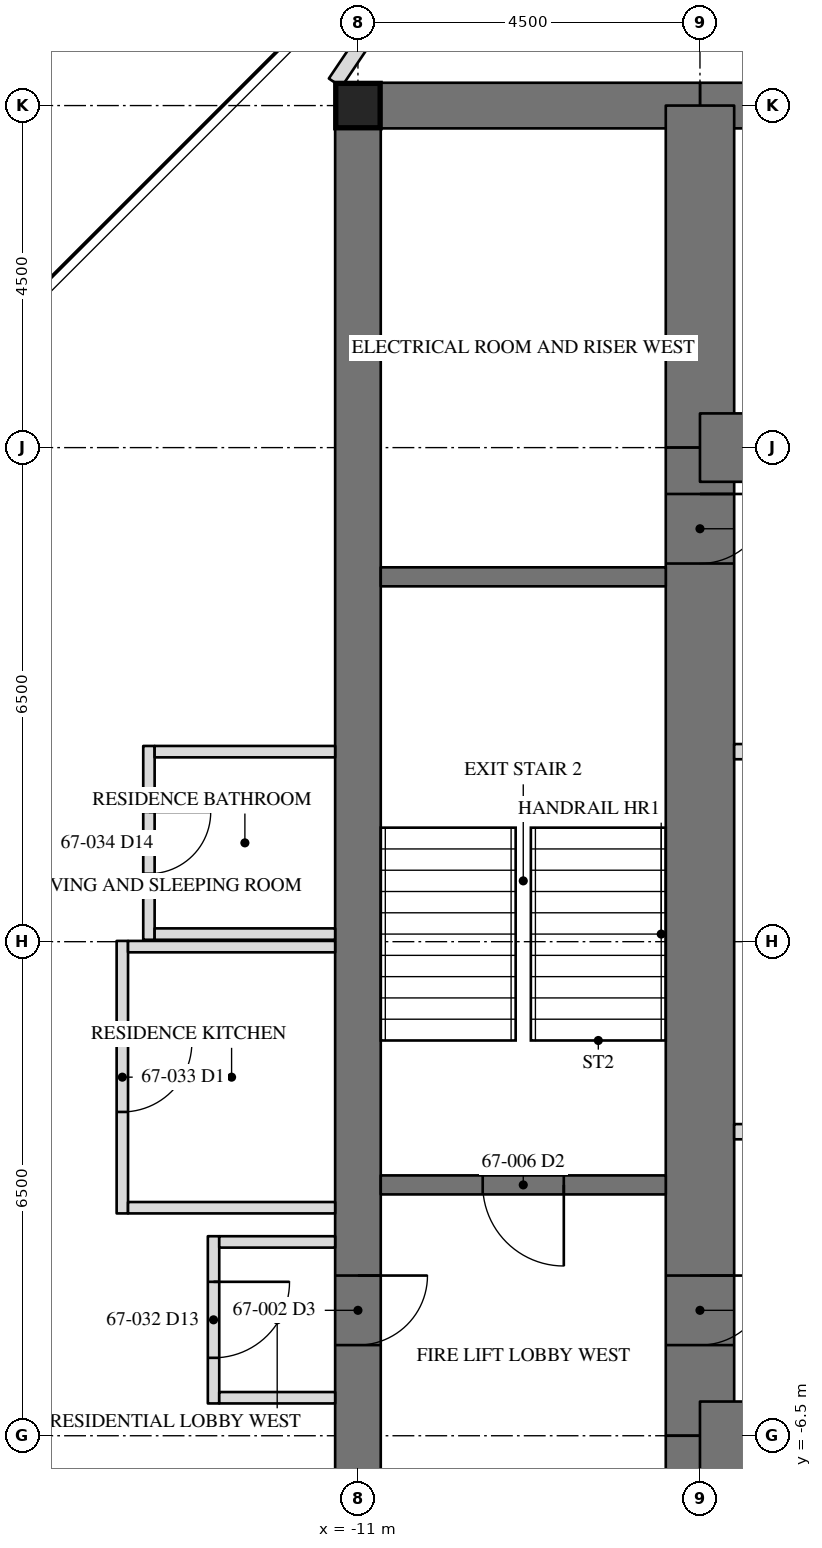
"""IFC4 building model, lengths in metres.
Left out: names, types, materials, properties, quantities, classifications, styles, units other than length and angle.
Written with IfcOpenShell. Run it as: python <this file> out.ifc"""

import sys

from ifc_helpers import new_model, si_unit, direction, frame, frame_2d, origin, origin_2d, place, context, subcontext, project, spatial, rectangle, hollow_rectangle, extrude, element, fill, save


model = new_model("IFC4")
c1 = context("Model", 3, precision=1e-05, world=origin(), true_north=direction((0.0, 1.0)))
c2 = subcontext(c1, "Body", "Model", "MODEL_VIEW")
j1 = project(units=[si_unit("LENGTHUNIT", "METRE"), si_unit("PLANEANGLEUNIT", "RADIAN")], contexts=[c1])
p1 = place(None, origin())
s1 = spatial("IfcSite", under=j1, at=p1, CompositionType="ELEMENT")
p2 = place(p1, origin())
s2 = spatial("IfcBuilding", under=s1, at=p2, CompositionType="ELEMENT")
p3 = place(p2, frame((0.0, 0.0, 274.0)))
s3 = spatial("IfcBuildingStorey", under=s2, at=p3, CompositionType="ELEMENT", Elevation=274.0)
p4 = place(p3, frame((-11.0, 11.0, 0.0), z_axis=(0.0, 0.0, 1.0), x_axis=(0.0, -1.0, 0.0)))
e1 = element("IfcWall", 1, at=p4, inside=s3, PredefinedType="SHEAR", context=c2, shape_type="SweptSolid", body=[
    extrude(rectangle(XDim=22.0, YDim=0.6, at=frame_2d((11.0, 0.0))), origin(), (0.0, 0.0, 1.0), 3.6),
])
p5 = place(p4, frame((15.393, 0.0, 0.0)))
e2 = element("IfcOpeningElement", 2, at=p5, cuts=e1, PredefinedType="OPENING", context=c2, shape_type="SweptSolid", body=[
    extrude(rectangle(XDim=0.915, YDim=2.134, at=frame_2d((0.458, 1.067))), frame((0.0, 0.31, 0.0), z_axis=(0.0, -1.0, 0.0), x_axis=(1.0, 0.0, 0.0)), (0.0, 0.0, 1.0), 0.62),
])
p6 = place(p3, frame((6.5, 11.0, 0.0), z_axis=(0.0, 0.0, 1.0), x_axis=(-1.0, 0.0, 0.0)))
e3 = element("IfcWall", 3, at=p6, inside=s3, PredefinedType="SHEAR", context=c2, shape_type="SweptSolid", body=[
    extrude(rectangle(XDim=13.0, YDim=0.6, at=frame_2d((6.5, 0.0))), origin(), (0.0, 0.0, 1.0), 3.6),
])
p7 = place(p6, frame((6.0, 0.0, 0.0)))
e4 = element("IfcOpeningElement", 4, at=p7, cuts=e3, PredefinedType="OPENING", context=c2, shape_type="SweptSolid", body=[
    extrude(rectangle(XDim=1.0, YDim=2.134, at=frame_2d((0.5, 1.067))), frame((0.0, 0.31, 0.0), z_axis=(0.0, -1.0, 0.0), x_axis=(1.0, 0.0, 0.0)), (0.0, 0.0, 1.0), 0.62),
])
p8 = place(p3, frame((-6.5, 11.0, 0.0), z_axis=(0.0, 0.0, 1.0), x_axis=(-1.0, 0.0, 0.0)))
e5 = element("IfcWall", 5, at=p8, inside=s3, PredefinedType="SHEAR", context=c2, shape_type="SweptSolid", body=[
    extrude(rectangle(XDim=4.5, YDim=0.6, at=frame_2d((2.25, 0.0))), origin(), (0.0, 0.0, 1.0), 3.6),
])
p9 = place(p3, frame((-6.5, 11.0, 0.0), z_axis=(0.0, 0.0, 1.0), x_axis=(0.0, -1.0, 0.0)))
e6 = element("IfcWall", 6, at=p9, inside=s3, PredefinedType="SHEAR", context=c2, shape_type="SweptSolid", body=[
    extrude(rectangle(XDim=4.5, YDim=0.9, at=frame_2d((2.25, 0.0))), origin(), (0.0, 0.0, 1.0), 3.6),
])
p10 = place(p3, frame((-6.5, 6.5, 0.0), z_axis=(0.0, 0.0, 1.0), x_axis=(0.0, -1.0, 0.0)))
e7 = element("IfcWall", 7, at=p10, inside=s3, PredefinedType="SHEAR", context=c2, shape_type="SweptSolid", body=[
    extrude(rectangle(XDim=13.0, YDim=0.9, at=frame_2d((6.5, 0.0))), origin(), (0.0, 0.0, 1.0), 3.6),
])
p11 = place(p10, frame((10.893, 0.0, 0.0)))
e8 = element("IfcOpeningElement", 8, at=p11, cuts=e7, PredefinedType="OPENING", context=c2, shape_type="SweptSolid", body=[
    extrude(rectangle(XDim=0.915, YDim=2.134, at=frame_2d((0.458, 1.067))), frame((0.0, 0.46, 0.0), z_axis=(0.0, -1.0, 0.0), x_axis=(1.0, 0.0, 0.0)), (0.0, 0.0, 1.0), 0.92),
])
p12 = place(p10, frame((0.61, 0.0, 0.0)))
e9 = element("IfcOpeningElement", 9, at=p12, cuts=e7, PredefinedType="OPENING", context=c2, shape_type="SweptSolid", body=[
    extrude(rectangle(XDim=0.915, YDim=2.134, at=frame_2d((0.458, 1.067))), frame((0.0, 0.46, 0.0), z_axis=(0.0, -1.0, 0.0), x_axis=(1.0, 0.0, 0.0)), (0.0, 0.0, 1.0), 0.92),
])
p13 = place(p3, frame((-6.5, -6.5, 0.0), z_axis=(0.0, 0.0, 1.0), x_axis=(0.0, -1.0, 0.0)))
e10 = element("IfcWall", 10, at=p13, inside=s3, PredefinedType="SHEAR", context=c2, shape_type="SweptSolid", body=[
    extrude(rectangle(XDim=4.5, YDim=0.9, at=frame_2d((2.25, 0.0))), origin(), (0.0, 0.0, 1.0), 3.6),
])
p14 = place(p3, frame((6.5, 6.5, 0.0), z_axis=(0.0, 0.0, 1.0), x_axis=(-1.0, 0.0, 0.0)))
e11 = element("IfcWall", 11, at=p14, inside=s3, PredefinedType="SHEAR", context=c2, shape_type="SweptSolid", body=[
    extrude(rectangle(XDim=13.0, YDim=0.9, at=frame_2d((6.5, 0.0))), origin(), (0.0, 0.0, 1.0), 3.6),
])
p15 = place(p14, frame((6.042, 0.0, 0.0)))
e12 = element("IfcOpeningElement", 12, at=p15, cuts=e11, PredefinedType="OPENING", context=c2, shape_type="SweptSolid", body=[
    extrude(rectangle(XDim=0.915, YDim=2.134, at=frame_2d((0.458, 1.067))), frame((0.0, 0.46, 0.0), z_axis=(0.0, -1.0, 0.0), x_axis=(1.0, 0.0, 0.0)), (0.0, 0.0, 1.0), 0.92),
])
p16 = place(p14, frame((9.766, 0.0, 0.0)))
e13 = element("IfcOpeningElement", 13, at=p16, cuts=e11, PredefinedType="OPENING", context=c2, shape_type="SweptSolid", body=[
    extrude(rectangle(XDim=1.118, YDim=2.134, at=frame_2d((0.559, 1.067))), frame((0.0, 0.46, 0.0), z_axis=(0.0, -1.0, 0.0), x_axis=(1.0, 0.0, 0.0)), (0.0, 0.0, 1.0), 0.92),
])
p17 = place(p14, frame((2.218, 0.0, 0.0)))
e14 = element("IfcOpeningElement", 14, at=p17, cuts=e11, PredefinedType="OPENING", context=c2, shape_type="SweptSolid", body=[
    extrude(rectangle(XDim=0.915, YDim=2.134, at=frame_2d((0.458, 1.067))), frame((0.0, 0.46, 0.0), z_axis=(0.0, -1.0, 0.0), x_axis=(1.0, 0.0, 0.0)), (0.0, 0.0, 1.0), 0.92),
])
p18 = place(p3, frame((-6.5, -6.5, 0.0), z_axis=(0.0, 0.0, 1.0), x_axis=(1.0, 0.0, 0.0)))
e15 = element("IfcWall", 15, at=p18, inside=s3, PredefinedType="SHEAR", context=c2, shape_type="SweptSolid", body=[
    extrude(rectangle(XDim=13.0, YDim=0.9, at=frame_2d((6.5, 0.0))), origin(), (0.0, 0.0, 1.0), 3.6),
])
p19 = place(p18, frame((6.042, 0.0, 0.0)))
e16 = element("IfcOpeningElement", 16, at=p19, cuts=e15, PredefinedType="OPENING", context=c2, shape_type="SweptSolid", body=[
    extrude(rectangle(XDim=0.915, YDim=2.134, at=frame_2d((0.458, 1.067))), frame((0.0, 0.46, 0.0), z_axis=(0.0, -1.0, 0.0), x_axis=(1.0, 0.0, 0.0)), (0.0, 0.0, 1.0), 0.92),
])
p20 = place(p18, frame((1.917, 0.0, 0.0)))
e17 = element("IfcOpeningElement", 17, at=p20, cuts=e15, PredefinedType="OPENING", context=c2, shape_type="SweptSolid", body=[
    extrude(rectangle(XDim=0.915, YDim=2.134, at=frame_2d((0.458, 1.067))), frame((0.0, 0.46, 0.0), z_axis=(0.0, -1.0, 0.0), x_axis=(1.0, 0.0, 0.0)), (0.0, 0.0, 1.0), 0.92),
])
p21 = place(p18, frame((9.567, 0.0, 0.0)))
e18 = element("IfcOpeningElement", 18, at=p21, cuts=e15, PredefinedType="OPENING", context=c2, shape_type="SweptSolid", body=[
    extrude(rectangle(XDim=0.915, YDim=2.134, at=frame_2d((0.458, 1.067))), frame((0.0, 0.46, 0.0), z_axis=(0.0, -1.0, 0.0), x_axis=(1.0, 0.0, 0.0)), (0.0, 0.0, 1.0), 0.92),
])
p22 = place(p3, frame((-11.0, 11.0, 0.0), z_axis=(0.0, 0.0, 1.0), x_axis=(1.0, 0.0, 0.0)))
e19 = element("IfcColumn", 19, at=p22, inside=s3, PredefinedType="COLUMN", context=c2, shape_type="SweptSolid", body=[
    extrude(hollow_rectangle(XDim=0.584, YDim=0.584, WallThickness=0.051, at=origin_2d()), origin(), (0.0, 0.0, 1.0), 3.6),
])
p23 = place(p3, frame((-6.95, 4.8, 0.0), z_axis=(0.0, 0.0, 1.0), x_axis=(-1.0, 0.0, 0.0)))
e20 = element("IfcWall", 20, at=p23, inside=s3, PredefinedType="SOLIDWALL", context=c2, shape_type="SweptSolid", body=[
    extrude(rectangle(XDim=3.75, YDim=0.25, at=frame_2d((1.875, 0.0))), origin(), (0.0, 0.0, 1.0), 3.41),
])
p24 = place(p3, frame((-6.95, -3.2, 0.0), z_axis=(0.0, 0.0, 1.0), x_axis=(-1.0, 0.0, 0.0)))
e21 = element("IfcWall", 21, at=p24, inside=s3, PredefinedType="SOLIDWALL", context=c2, shape_type="SweptSolid", body=[
    extrude(rectangle(XDim=3.75, YDim=0.25, at=frame_2d((1.875, 0.0))), origin(), (0.0, 0.0, 1.0), 3.41),
])
p25 = place(p24, frame((1.342, 0.0, 0.0)))
e22 = element("IfcOpeningElement", 22, at=p25, cuts=e21, PredefinedType="OPENING", context=c2, shape_type="SweptSolid", body=[
    extrude(rectangle(XDim=1.067, YDim=2.134, at=frame_2d((0.533, 1.067))), frame((0.0, 0.135, 0.0), z_axis=(0.0, -1.0, 0.0), x_axis=(1.0, 0.0, 0.0)), (0.0, 0.0, 1.0), 0.27),
])
p26 = place(p3, frame((-6.05, 2.5, 0.0), z_axis=(0.0, 0.0, 1.0), x_axis=(1.0, 0.0, 0.0)))
e23 = element("IfcWall", 23, at=p26, inside=s3, PredefinedType="PARTITIONING", context=c2, shape_type="SweptSolid", body=[
    extrude(rectangle(XDim=12.1, YDim=0.2, at=frame_2d((6.05, 0.0))), origin(), (0.0, 0.0, 1.0), 3.41),
])
p27 = place(p26, frame((1.408, 0.0, 0.0)))
e24 = element("IfcOpeningElement", 24, at=p27, cuts=e23, PredefinedType="OPENING", context=c2, shape_type="SweptSolid", body=[
    extrude(rectangle(XDim=1.067, YDim=2.134, at=frame_2d((0.533, 1.067))), frame((0.0, 0.11, 0.0), z_axis=(0.0, -1.0, 0.0), x_axis=(1.0, 0.0, 0.0)), (0.0, 0.0, 1.0), 0.22),
])
p28 = place(p26, frame((5.517, 0.0, 0.0)))
e25 = element("IfcOpeningElement", 25, at=p28, cuts=e23, PredefinedType="OPENING", context=c2, shape_type="SweptSolid", body=[
    extrude(rectangle(XDim=1.067, YDim=2.134, at=frame_2d((0.533, 1.067))), frame((0.0, 0.11, 0.0), z_axis=(0.0, -1.0, 0.0), x_axis=(1.0, 0.0, 0.0)), (0.0, 0.0, 1.0), 0.22),
])
p29 = place(p26, frame((9.625, 0.0, 0.0)))
e26 = element("IfcOpeningElement", 26, at=p29, cuts=e23, PredefinedType="OPENING", context=c2, shape_type="SweptSolid", body=[
    extrude(rectangle(XDim=1.067, YDim=2.134, at=frame_2d((0.533, 1.067))), frame((0.0, 0.11, 0.0), z_axis=(0.0, -1.0, 0.0), x_axis=(1.0, 0.0, 0.0)), (0.0, 0.0, 1.0), 0.22),
])
p30 = place(p3, frame((6.05, -2.5, 0.0), z_axis=(0.0, 0.0, 1.0), x_axis=(-1.0, 0.0, 0.0)))
e27 = element("IfcWall", 27, at=p30, inside=s3, PredefinedType="PARTITIONING", context=c2, shape_type="SweptSolid", body=[
    extrude(rectangle(XDim=12.1, YDim=0.2, at=frame_2d((6.05, 0.0))), origin(), (0.0, 0.0, 1.0), 3.41),
])
p31 = place(p30, frame((9.625, 0.0, 0.0)))
e28 = element("IfcOpeningElement", 28, at=p31, cuts=e27, PredefinedType="OPENING", context=c2, shape_type="SweptSolid", body=[
    extrude(rectangle(XDim=1.067, YDim=2.134, at=frame_2d((0.533, 1.067))), frame((0.0, 0.11, 0.0), z_axis=(0.0, -1.0, 0.0), x_axis=(1.0, 0.0, 0.0)), (0.0, 0.0, 1.0), 0.22),
])
p32 = place(p30, frame((5.517, 0.0, 0.0)))
e29 = element("IfcOpeningElement", 29, at=p32, cuts=e27, PredefinedType="OPENING", context=c2, shape_type="SweptSolid", body=[
    extrude(rectangle(XDim=1.067, YDim=2.134, at=frame_2d((0.533, 1.067))), frame((0.0, 0.11, 0.0), z_axis=(0.0, -1.0, 0.0), x_axis=(1.0, 0.0, 0.0)), (0.0, 0.0, 1.0), 0.22),
])
p33 = place(p30, frame((1.408, 0.0, 0.0)))
e30 = element("IfcOpeningElement", 30, at=p33, cuts=e27, PredefinedType="OPENING", context=c2, shape_type="SweptSolid", body=[
    extrude(rectangle(XDim=1.067, YDim=2.134, at=frame_2d((0.533, 1.067))), frame((0.0, 0.11, 0.0), z_axis=(0.0, -1.0, 0.0), x_axis=(1.0, 0.0, 0.0)), (0.0, 0.0, 1.0), 0.22),
])
p34 = place(p3, frame((-11.3, 11.3, 0.0), z_axis=(0.0, 0.0, 1.0), x_axis=(0.558834300538, 0.829279340477, 0.0)))
e31 = element("IfcWall", 31, at=p34, inside=s3, PredefinedType="PARTITIONING", context=c2, shape_type="SweptSolid", body=[
    extrude(rectangle(XDim=3.048, YDim=0.2, at=frame_2d((1.524, 0.0))), origin(), (0.0, 0.0, 1.0), 2.704),
])
p35 = place(p3, frame((-12.9, -3.875, 0.0), z_axis=(0.0, 0.0, 1.0), x_axis=(0.0, -1.0, 0.0)))
e32 = element("IfcWall", 32, at=p35, inside=s3, PredefinedType="PARTITIONING", context=c2, shape_type="SweptSolid", body=[
    extrude(rectangle(XDim=2.2, YDim=0.15, at=frame_2d((1.1, 0.0))), origin(), (0.0, 0.0, 1.0), 3.41),
])
p36 = place(p35, frame((0.6, 0.0, 0.0)))
e33 = element("IfcOpeningElement", 33, at=p36, cuts=e32, PredefinedType="OPENING", context=c2, shape_type="SweptSolid", body=[
    extrude(rectangle(XDim=1.0, YDim=2.134, at=frame_2d((0.5, 1.067))), frame((0.0, 0.085, 0.0), z_axis=(0.0, -1.0, 0.0), x_axis=(1.0, 0.0, 0.0)), (0.0, 0.0, 1.0), 0.17),
])
for number, where, z_axis, x_axis in (
    (34, (-11.3, -3.95, 0.0), (0.0, 0.0, 1.0), (-1.0, 0.0, 0.0)),
    (35, (-11.3, -6.0, 0.0), (0.0, 0.0, 1.0), (-1.0, 0.0, 0.0)),
):
    element("IfcWall", number, at=place(p3, frame(where, z_axis=z_axis, x_axis=x_axis)), inside=s3, PredefinedType="PARTITIONING", context=c2, shape_type="SweptSolid", body=[
        extrude(rectangle(XDim=1.525, YDim=0.15, at=frame_2d((0.762, 0.0))), origin(), (0.0, 0.0, 1.0), 3.41),
    ])
p37 = place(p3, frame((-14.1, 0.01, 0.0), z_axis=(0.0, 0.0, 1.0), x_axis=(0.0, -1.0, 0.0)))
e36 = element("IfcWall", 36, at=p37, inside=s3, PredefinedType="PARTITIONING", context=c2, shape_type="SweptSolid", body=[
    extrude(rectangle(XDim=3.585, YDim=0.15, at=frame_2d((1.792, 0.0))), origin(), (0.0, 0.0, 1.0), 3.41),
])
p38 = place(p37, frame((1.335, 0.0, 0.0)))
e37 = element("IfcOpeningElement", 37, at=p38, cuts=e36, PredefinedType="OPENING", context=c2, shape_type="SweptSolid", body=[
    extrude(rectangle(XDim=0.915, YDim=2.134, at=frame_2d((0.458, 1.067))), frame((0.0, 0.085, 0.0), z_axis=(0.0, -1.0, 0.0), x_axis=(1.0, 0.0, 0.0)), (0.0, 0.0, 1.0), 0.17),
])
p39 = place(p3, frame((-11.3, -0.065, 0.0), z_axis=(0.0, 0.0, 1.0), x_axis=(-1.0, 0.0, 0.0)))
e38 = element("IfcWall", 38, at=p39, inside=s3, PredefinedType="PARTITIONING", context=c2, shape_type="SweptSolid", body=[
    extrude(rectangle(XDim=2.725, YDim=0.15, at=frame_2d((1.362, 0.0))), origin(), (0.0, 0.0, 1.0), 2.709),
])
p40 = place(p3, frame((-11.3, -3.5, 0.0), z_axis=(0.0, 0.0, 1.0), x_axis=(-1.0, 0.0, 0.0)))
e39 = element("IfcWall", 39, at=p40, inside=s3, PredefinedType="PARTITIONING", context=c2, shape_type="SweptSolid", body=[
    extrude(rectangle(XDim=2.725, YDim=0.15, at=frame_2d((1.362, 0.0))), origin(), (0.0, 0.0, 1.0), 3.41),
])
p41 = place(p3, frame((-13.75, 2.575, 0.0), z_axis=(0.0, 0.0, 1.0), x_axis=(0.0, -1.0, 0.0)))
e40 = element("IfcWall", 40, at=p41, inside=s3, PredefinedType="PARTITIONING", context=c2, shape_type="SweptSolid", body=[
    extrude(rectangle(XDim=2.55, YDim=0.15, at=frame_2d((1.275, 0.0))), origin(), (0.0, 0.0, 1.0), 3.41),
])
p42 = place(p41, frame((0.868, 0.0, 0.0)))
e41 = element("IfcOpeningElement", 41, at=p42, cuts=e40, PredefinedType="OPENING", context=c2, shape_type="SweptSolid", body=[
    extrude(rectangle(XDim=0.813, YDim=2.032, at=frame_2d((0.406, 1.016))), frame((0.0, 0.085, 0.0), z_axis=(0.0, -1.0, 0.0), x_axis=(1.0, 0.0, 0.0)), (0.0, 0.0, 1.0), 0.17),
])
p43 = place(p3, frame((-11.3, 2.5, 0.0), z_axis=(0.0, 0.0, 1.0), x_axis=(-1.0, 0.0, 0.0)))
e42 = element("IfcWall", 42, at=p43, inside=s3, PredefinedType="PARTITIONING", context=c2, shape_type="SweptSolid", body=[
    extrude(rectangle(XDim=2.375, YDim=0.15, at=frame_2d((1.188, 0.0))), origin(), (0.0, 0.0, 1.0), 3.41),
])
p44 = place(p3, frame((-11.3, 0.1, 0.0), z_axis=(0.0, 0.0, 1.0), x_axis=(-1.0, 0.0, 0.0)))
e43 = element("IfcWall", 43, at=p44, inside=s3, PredefinedType="PARTITIONING", context=c2, shape_type="SweptSolid", body=[
    extrude(rectangle(XDim=2.375, YDim=0.15, at=frame_2d((1.188, 0.0))), origin(), (0.0, 0.0, 1.0), 2.709),
])
p45 = place(p5, origin())
e44 = element("IfcDoor", 44, at=p45, inside=s3, OperationType="SINGLE_SWING_RIGHT", PredefinedType="DOOR", context=c2, shape_type="SweptSolid", body=[
    extrude(rectangle(XDim=0.915, YDim=2.134, at=frame_2d((0.458, 1.067))), frame((0.0, -0.225, 0.0), z_axis=(0.0, -1.0, 0.0), x_axis=(1.0, 0.0, 0.0)), (0.0, 0.0, 1.0), 0.05),
])
fill(e2, e44)
p46 = place(p11, origin())
e45 = element("IfcDoor", 45, at=p46, inside=s3, OperationType="SINGLE_SWING_RIGHT", PredefinedType="DOOR", context=c2, shape_type="SweptSolid", body=[
    extrude(rectangle(XDim=0.915, YDim=2.134, at=frame_2d((0.458, 1.067))), frame((0.0, -0.375, 0.0), z_axis=(0.0, -1.0, 0.0), x_axis=(1.0, 0.0, 0.0)), (0.0, 0.0, 1.0), 0.05),
])
fill(e8, e45)
p47 = place(p25, origin())
e46 = element("IfcDoor", 46, at=p47, inside=s3, OperationType="SINGLE_SWING_LEFT", PredefinedType="DOOR", context=c2, shape_type="SweptSolid", body=[
    extrude(rectangle(XDim=1.067, YDim=2.134, at=frame_2d((0.533, 1.067))), frame((0.0, 0.025, 0.0), z_axis=(0.0, -1.0, 0.0), x_axis=(1.0, 0.0, 0.0)), (0.0, 0.0, 1.0), 0.05),
])
fill(e22, e46)
p48 = place(p12, origin())
e47 = element("IfcDoor", 47, at=p48, inside=s3, OperationType="SINGLE_SWING_RIGHT", PredefinedType="DOOR", context=c2, shape_type="SweptSolid", body=[
    extrude(rectangle(XDim=0.915, YDim=2.134, at=frame_2d((0.458, 1.067))), frame((0.0, -0.375, 0.0), z_axis=(0.0, -1.0, 0.0), x_axis=(1.0, 0.0, 0.0)), (0.0, 0.0, 1.0), 0.05),
])
fill(e9, e47)
p49 = place(p36, origin())
e48 = element("IfcDoor", 48, at=p49, inside=s3, OperationType="SINGLE_SWING_RIGHT", PredefinedType="DOOR", context=c2, shape_type="SweptSolid", body=[
    extrude(rectangle(XDim=1.0, YDim=2.134, at=frame_2d((0.5, 1.067))), frame((0.0, 0.025, 0.0), z_axis=(0.0, -1.0, 0.0), x_axis=(1.0, 0.0, 0.0)), (0.0, 0.0, 1.0), 0.05),
])
fill(e33, e48)
p50 = place(p38, origin())
e49 = element("IfcDoor", 49, at=p50, inside=s3, OperationType="SINGLE_SWING_LEFT", PredefinedType="DOOR", context=c2, shape_type="SweptSolid", body=[
    extrude(rectangle(XDim=0.915, YDim=2.134, at=frame_2d((0.458, 1.067))), frame((0.0, 0.025, 0.0), z_axis=(0.0, -1.0, 0.0), x_axis=(1.0, 0.0, 0.0)), (0.0, 0.0, 1.0), 0.05),
])
fill(e37, e49)
p51 = place(p42, origin())
e50 = element("IfcDoor", 50, at=p51, inside=s3, OperationType="SINGLE_SWING_LEFT", PredefinedType="DOOR", context=c2, shape_type="SweptSolid", body=[
    extrude(rectangle(XDim=0.813, YDim=2.032, at=frame_2d((0.406, 1.016))), frame((0.0, 0.025, 0.0), z_axis=(0.0, -1.0, 0.0), x_axis=(1.0, 0.0, 0.0)), (0.0, 0.0, 1.0), 0.05),
])
fill(e41, e50)
save(model, sys.argv[1])
